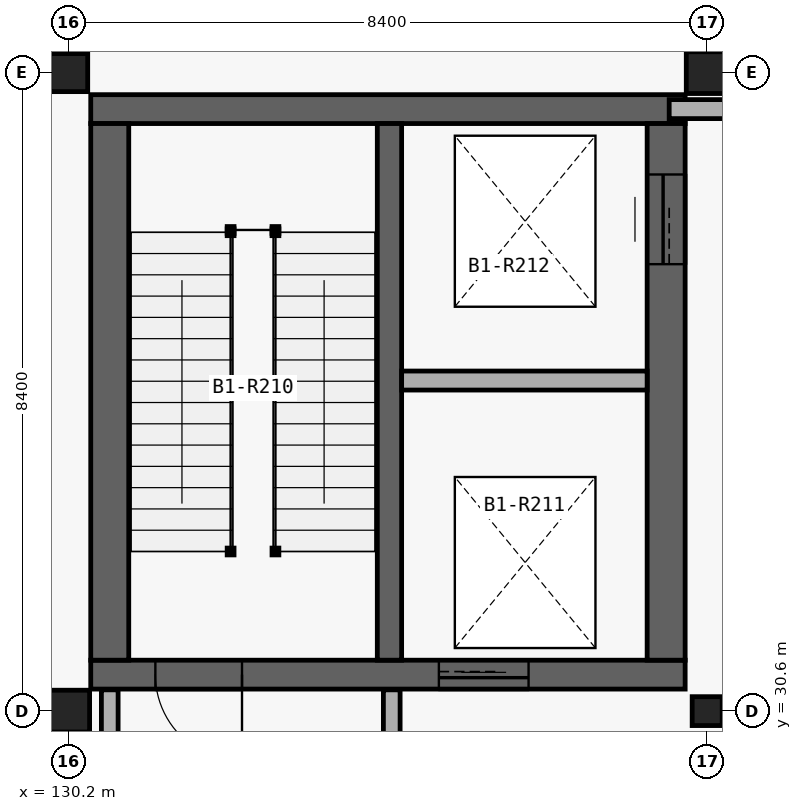
"""IFC4 building model, lengths in metres.
Left out: names, types, materials, properties, quantities, classifications, styles, units other than length and angle.
Written with IfcOpenShell. Run it as: python <this file> out.ifc"""

import sys

from ifc_helpers import new_model, si_unit, direction, frame, frame_2d, origin_with_axes, origin_2d_with_axis, place, context, subcontext, project, spatial, rectangle, i_section, extrude, element, fill, save


model = new_model("IFC4")
c1 = context("Model", 3, precision=1e-05, world=origin_with_axes(), true_north=direction((0.0, 1.0)))
c2 = subcontext(c1, "Body", "Model", "MODEL_VIEW")
j1 = project(units=[si_unit("LENGTHUNIT", "METRE"), si_unit("PLANEANGLEUNIT", "RADIAN")], contexts=[c1])
p1 = place(None, origin_with_axes())
s1 = spatial("IfcSite", under=j1, at=p1, CompositionType="ELEMENT")
p2 = place(p1, origin_with_axes())
s2 = spatial("IfcBuilding", under=s1, at=p2, CompositionType="ELEMENT")
p3 = place(p2, frame((0.0, 0.0, -4.8), z_axis=(0.0, 0.0, 1.0), x_axis=(1.0, 0.0, 0.0)))
s3 = spatial("IfcBuildingStorey", under=s2, at=p3, CompositionType="ELEMENT", Elevation=-4.8)
p4 = place(None, frame((130.49, 31.08, -5.35), z_axis=(0.0, 0.0, 1.0), x_axis=(1.0, 0.0, 0.0)))
e1 = element("IfcWall", 1, at=p4, inside=s3, PredefinedType="SHEAR", context=c2, shape_type="SweptSolid", body=[
    extrude(rectangle(XDim=7.82, YDim=0.38, at=frame_2d((3.91, 0.0), x_axis=(1.0, 0.0))), origin_with_axes(), (0.0, 0.0, 1.0), 5.35),
])
p5 = place(None, frame((131.91, 31.08, -4.8), z_axis=(0.0, 0.0, 1.0), x_axis=(1.0, 0.0, 0.0)))
e2 = element("IfcOpeningElement", 2, at=p5, cuts=e1, PredefinedType="OPENING", context=c2, shape_type="SweptSolid", body=[
    extrude(rectangle(XDim=1.14, YDim=2.18, at=frame_2d((0.0, 1.09), x_axis=(1.0, 0.0))), frame((0.0, 0.2, 0.0), z_axis=(0.0, -1.0, 0.0), x_axis=(1.0, 0.0, 0.0)), (0.0, 0.0, 1.0), 0.4),
])
p6 = place(None, frame((135.66, 31.08, -4.8), z_axis=(0.0, 0.0, 1.0), x_axis=(1.0, 0.0, 0.0)))
e3 = element("IfcOpeningElement", 3, at=p6, cuts=e1, PredefinedType="OPENING", context=c2, shape_type="SweptSolid", body=[
    extrude(rectangle(XDim=1.18, YDim=2.24, at=frame_2d((0.0, 1.12), x_axis=(1.0, 0.0))), frame((0.0, 0.2, 0.0), z_axis=(0.0, -1.0, 0.0), x_axis=(1.0, 0.0, 0.0)), (0.0, 0.0, 1.0), 0.4),
])
p7 = place(None, frame((138.31, 38.52, -5.35), z_axis=(0.0, 0.0, 1.0), x_axis=(-1.0, 0.0, 0.0)))
e4 = element("IfcWall", 4, at=p7, inside=s3, PredefinedType="SHEAR", context=c2, shape_type="SweptSolid", body=[
    extrude(rectangle(XDim=7.82, YDim=0.38, at=frame_2d((3.91, 0.0), x_axis=(1.0, 0.0))), origin_with_axes(), (0.0, 0.0, 1.0), 5.35),
])
p8 = place(None, frame((138.06, 31.27, -5.35), z_axis=(0.0, 0.0, 1.0), x_axis=(0.0, 1.0, 0.0)))
e5 = element("IfcWall", 5, at=p8, inside=s3, PredefinedType="SHEAR", context=c2, shape_type="SweptSolid", body=[
    extrude(rectangle(XDim=7.06, YDim=0.5, at=frame_2d((3.53, 0.0), x_axis=(1.0, 0.0))), origin_with_axes(), (0.0, 0.0, 1.0), 5.35),
])
p9 = place(None, frame((138.06, 37.07, -4.8), z_axis=(0.0, 0.0, 1.0), x_axis=(0.0, 1.0, 0.0)))
e6 = element("IfcOpeningElement", 6, at=p9, cuts=e5, PredefinedType="OPENING", context=c2, shape_type="SweptSolid", body=[
    extrude(rectangle(XDim=1.18, YDim=2.24, at=frame_2d((0.0, 1.12), x_axis=(1.0, 0.0))), frame((0.0, 0.26, 0.0), z_axis=(0.0, -1.0, 0.0), x_axis=(1.0, 0.0, 0.0)), (0.0, 0.0, 1.0), 0.52),
])
p10 = place(None, frame((130.74, 38.33, -5.35), z_axis=(0.0, 0.0, 1.0), x_axis=(0.0, -1.0, 0.0)))
e7 = element("IfcWall", 7, at=p10, inside=s3, PredefinedType="SHEAR", context=c2, shape_type="SweptSolid", body=[
    extrude(rectangle(XDim=7.06, YDim=0.5, at=frame_2d((3.53, 0.0), x_axis=(1.0, 0.0))), origin_with_axes(), (0.0, 0.0, 1.0), 5.35),
])
p11 = place(None, frame((134.42, 31.27, -5.35), z_axis=(0.0, 0.0, 1.0), x_axis=(0.0, 1.0, 0.0)))
e8 = element("IfcWall", 8, at=p11, inside=s3, PredefinedType="SHEAR", context=c2, shape_type="SweptSolid", body=[
    extrude(rectangle(XDim=7.06, YDim=0.32, at=frame_2d((3.53, 0.0), x_axis=(1.0, 0.0))), origin_with_axes(), (0.0, 0.0, 1.0), 5.35),
])
p12 = place(None, frame((134.58, 34.949, -4.8), z_axis=(0.0, 0.0, 1.0), x_axis=(1.0, 0.0, 0.0)))
e9 = element("IfcWall", 9, at=p12, inside=s3, PredefinedType="PARTITIONING", context=c2, shape_type="SweptSolid", body=[
    extrude(rectangle(XDim=3.23, YDim=0.25, at=frame_2d((1.615, 0.0), x_axis=(1.0, 0.0))), origin_with_axes(), (0.0, 0.0, 1.0), 4.44),
])
p13 = place(None, frame((138.1, 38.52, -4.8), z_axis=(0.0, 0.0, 1.0), x_axis=(1.0, 0.0, 0.0)))
e10 = element("IfcWall", 10, at=p13, inside=s3, PredefinedType="PARTITIONING", context=c2, shape_type="SweptSolid", body=[
    extrude(rectangle(XDim=3.36, YDim=0.25, at=frame_2d((1.68, 0.0), x_axis=(1.0, 0.0))), origin_with_axes(), (0.0, 0.0, 1.0), 4.44),
])
for number, where, z_axis, x_axis in (
    (11, (130.74, 29.62, -4.8), (0.0, 0.0, 1.0), (0.0, 1.0, 0.0)),
    (12, (134.45, 29.62, -4.8), (0.0, 0.0, 1.0), (0.0, 1.0, 0.0)),
):
    element("IfcWall", number, at=place(None, frame(where, z_axis=z_axis, x_axis=x_axis)), inside=s3, PredefinedType="PARTITIONING", context=c2, shape_type="SweptSolid", body=[
        extrude(rectangle(XDim=1.26, YDim=0.22, at=frame_2d((0.63, 0.0), x_axis=(1.0, 0.0))), origin_with_axes(), (0.0, 0.0, 1.0), 4.44),
    ])
p14 = place(None, frame((130.2, 30.6, -5.35), z_axis=(0.0, 0.0, 1.0), x_axis=(1.0, 0.0, 0.0)))
e13 = element("IfcColumn", 13, at=p14, inside=s3, PredefinedType="COLUMN", context=c2, shape_type="SweptSolid", body=[
    extrude(i_section(OverallWidth=0.55, OverallDepth=0.55, WebThickness=0.025, FlangeThickness=0.042, at=origin_2d_with_axis()), origin_with_axes(), (0.0, 0.0, 1.0), 5.35),
])
p15 = place(None, frame((130.2, 39.0, -5.35), z_axis=(0.0, 0.0, 1.0), x_axis=(1.0, 0.0, 0.0)))
e14 = element("IfcColumn", 14, at=p15, inside=s3, PredefinedType="COLUMN", context=c2, shape_type="SweptSolid", body=[
    extrude(i_section(OverallWidth=0.5, OverallDepth=0.5, WebThickness=0.022, FlangeThickness=0.036, at=origin_2d_with_axis()), origin_with_axes(), (0.0, 0.0, 1.0), 5.35),
])
p16 = place(None, frame((138.6, 30.6, -5.35), z_axis=(0.0, 0.0, 1.0), x_axis=(1.0, 0.0, 0.0)))
e15 = element("IfcColumn", 15, at=p16, inside=s3, PredefinedType="COLUMN", context=c2, shape_type="SweptSolid", body=[
    extrude(i_section(OverallWidth=0.395, OverallDepth=0.38, WebThickness=0.019, FlangeThickness=0.03, at=origin_2d_with_axis()), origin_with_axes(), (0.0, 0.0, 1.0), 5.35),
])
p17 = place(None, frame((138.6, 39.0, -5.35), z_axis=(0.0, 0.0, 1.0), x_axis=(1.0, 0.0, 0.0)))
e16 = element("IfcColumn", 16, at=p17, inside=s3, PredefinedType="COLUMN", context=c2, shape_type="SweptSolid", body=[
    extrude(i_section(OverallWidth=0.55, OverallDepth=0.55, WebThickness=0.025, FlangeThickness=0.042, at=origin_2d_with_axis()), origin_with_axes(), (0.0, 0.0, 1.0), 5.35),
])
p18 = place(None, frame((131.91, 31.08, -4.8), z_axis=(0.0, 0.0, 1.0), x_axis=(-1.0, 0.0, 0.0)))
e17 = element("IfcDoor", 17, at=p18, inside=s3, OperationType="SINGLE_SWING_RIGHT", PredefinedType="DOOR", context=c2, shape_type="SweptSolid", body=[
    extrude(rectangle(XDim=1.14, YDim=2.18, at=frame_2d((0.0, 1.09), x_axis=(1.0, 0.0))), frame((0.0, 0.04, 0.0), z_axis=(0.0, -1.0, 0.0), x_axis=(1.0, 0.0, 0.0)), (0.0, 0.0, 1.0), 0.08),
])
fill(e2, e17)
p19 = place(None, frame((135.66, 31.08, -4.8), z_axis=(0.0, 0.0, 1.0), x_axis=(-1.0, 0.0, 0.0)))
e18 = element("IfcDoor", 18, at=p19, inside=s3, OperationType="SLIDING_TO_LEFT", PredefinedType="DOOR", context=c2, shape_type="SweptSolid", body=[
    extrude(rectangle(XDim=1.18, YDim=2.24, at=frame_2d((0.0, 1.12), x_axis=(1.0, 0.0))), frame((0.0, 0.04, 0.0), z_axis=(0.0, -1.0, 0.0), x_axis=(1.0, 0.0, 0.0)), (0.0, 0.0, 1.0), 0.08),
])
fill(e3, e18)
p20 = place(None, frame((138.06, 37.07, -4.8), z_axis=(0.0, 0.0, 1.0), x_axis=(0.0, 1.0, 0.0)))
e19 = element("IfcDoor", 19, at=p20, inside=s3, OperationType="SLIDING_TO_LEFT", PredefinedType="DOOR", context=c2, shape_type="SweptSolid", body=[
    extrude(rectangle(XDim=1.18, YDim=2.24, at=frame_2d((0.0, 1.12), x_axis=(1.0, 0.0))), frame((0.0, 0.04, 0.0), z_axis=(0.0, -1.0, 0.0), x_axis=(1.0, 0.0, 0.0)), (0.0, 0.0, 1.0), 0.08),
])
fill(e6, e19)
save(model, sys.argv[1])
